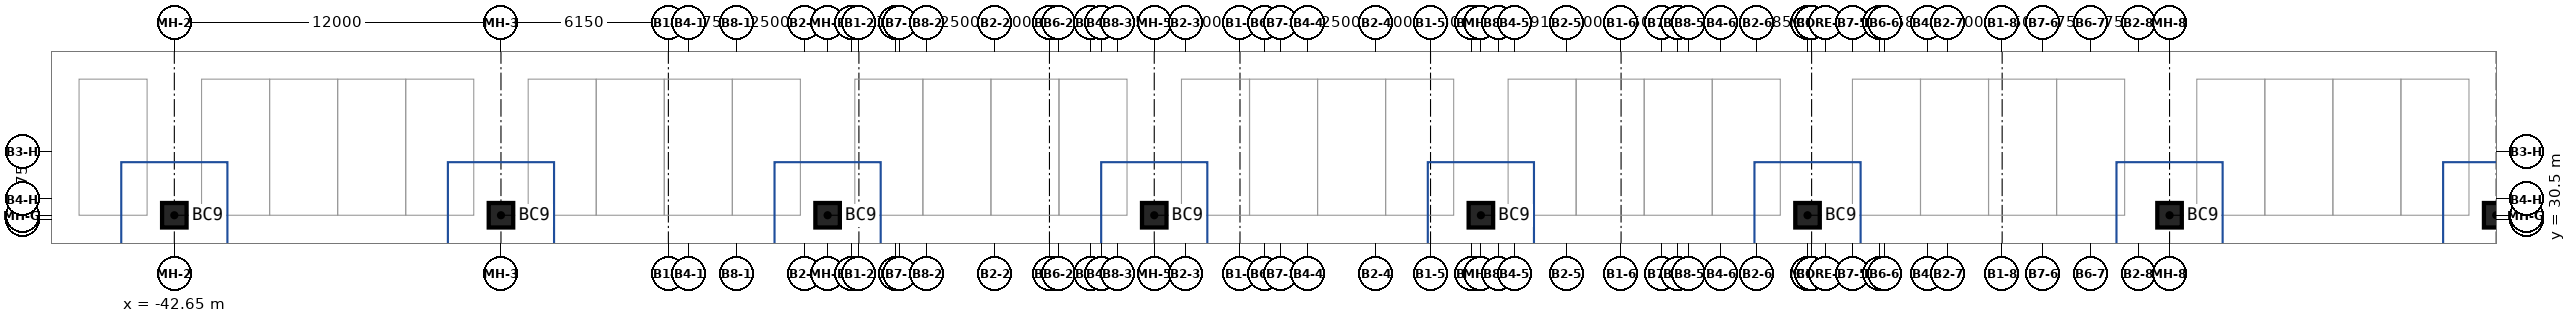
"""IFC4 building model, lengths in metres.
Left out: names, types, materials, properties, quantities, classifications, styles, units other than length and angle.
Written with IfcOpenShell. Run it as: python <this file> out.ifc"""

import sys

from ifc_helpers import new_model, si_unit, direction, frame, origin, origin_2d, place, context, subcontext, project, spatial, rectangle, extrude, source, transform, mapped, element, save


model = new_model("IFC4")
c1 = context("Model", 3, precision=1e-05, world=origin(), true_north=direction((0.0, 1.0)))
c2 = subcontext(c1, "Body", "Model", "MODEL_VIEW")
j1 = project(units=[si_unit("LENGTHUNIT", "METRE"), si_unit("PLANEANGLEUNIT", "RADIAN")], contexts=[c1])
p1 = place(None, origin())
s1 = spatial("IfcSite", under=j1, at=p1, CompositionType="ELEMENT")
p2 = place(p1, origin())
s2 = spatial("IfcBuilding", under=s1, at=p2, CompositionType="ELEMENT")
p3 = place(p2, frame((0.0, 0.0, -9.0)))
s3 = spatial("IfcBuildingStorey", under=s2, at=p3, CompositionType="ELEMENT", Elevation=-9.0)
m1 = source(origin(), c2, "Body", "SweptSolid", [
    extrude(rectangle(XDim=0.9, YDim=0.9, at=origin_2d()), origin(), (0.0, 0.0, 1.0), 4.5),
])
for number, where, z_axis, x_axis in (
    (1, (-42.65, 30.65, 0.0), (0.0, 0.0, 1.0), (1.0, 0.0, 0.0)),
    (2, (-30.65, 30.65, 0.0), (0.0, 0.0, 1.0), (1.0, 0.0, 0.0)),
    (3, (-18.65, 30.65, 0.0), (0.0, 0.0, 1.0), (1.0, 0.0, 0.0)),
    (4, (-6.65, 30.65, 0.0), (0.0, 0.0, 1.0), (1.0, 0.0, 0.0)),
    (5, (5.35, 30.65, 0.0), (0.0, 0.0, 1.0), (1.0, 0.0, 0.0)),
    (6, (17.35, 30.65, 0.0), (0.0, 0.0, 1.0), (1.0, 0.0, 0.0)),
    (7, (30.65, 30.65, 0.0), (0.0, 0.0, 1.0), (1.0, 0.0, 0.0)),
    (8, (42.65, 30.65, 0.0), (0.0, 0.0, 1.0), (1.0, 0.0, 0.0)),
):
    element("IfcColumn", number, at=place(p3, frame(where, z_axis=z_axis, x_axis=x_axis)), inside=s3, PredefinedType="COLUMN", context=c2, shape_type="MappedRepresentation", body=[
        mapped(m1, transform((0.0, 0.0, 0.0))),
    ])
save(model, sys.argv[1])
